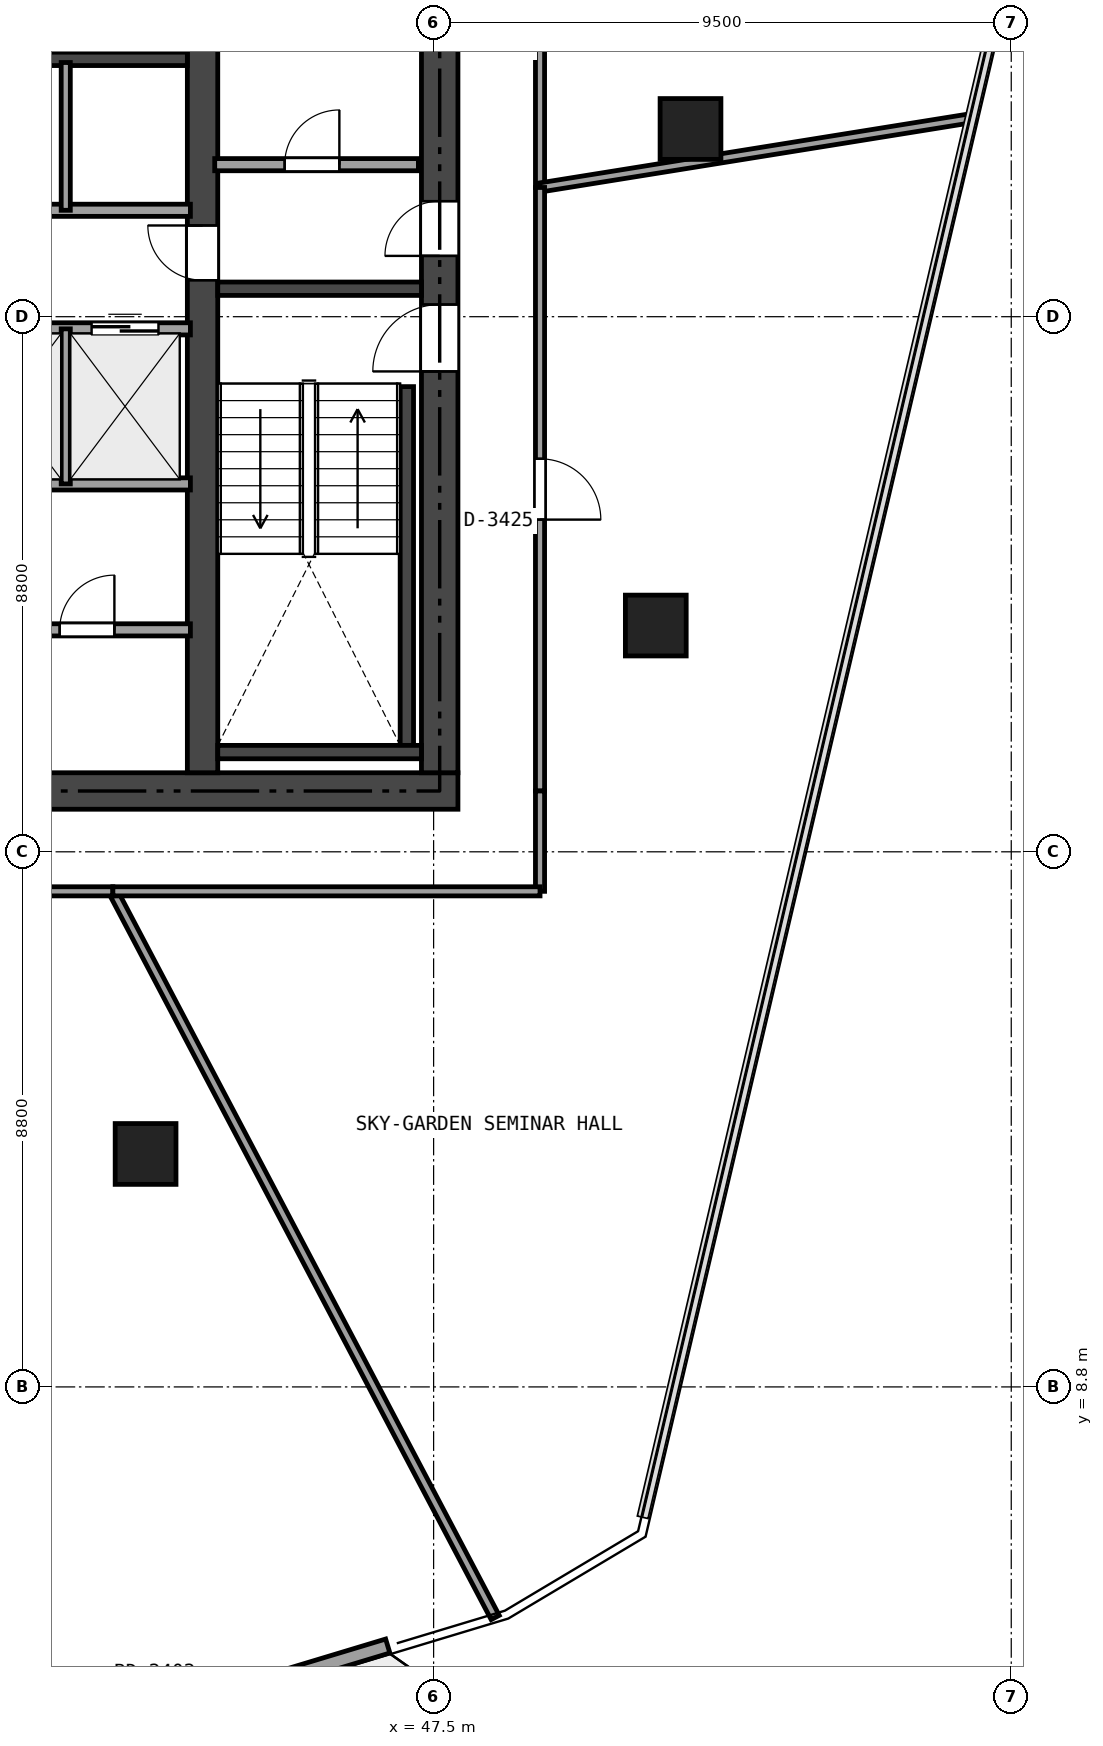
"""IFC4 building model, lengths in metres.
Left out: names, types, materials, properties, quantities, classifications, styles, units other than length and angle.
Written with IfcOpenShell. Run it as: python <this file> out.ifc"""

import sys

from ifc_helpers import new_model, si_unit, direction, frame, frame_2d, origin, origin_2d, place, context, subcontext, project, spatial, rectangle, extrude, element, fill, save


model = new_model("IFC4")
c1 = context("Model", 3, precision=1e-05, world=origin(), true_north=direction((0.0, 1.0)))
c2 = subcontext(c1, "Body", "Model", "MODEL_VIEW")
j1 = project(units=[si_unit("LENGTHUNIT", "METRE"), si_unit("PLANEANGLEUNIT", "RADIAN")], contexts=[c1])
p1 = place(None, origin())
s1 = spatial("IfcSite", under=j1, at=p1, CompositionType="ELEMENT")
p2 = place(p1, origin())
s2 = spatial("IfcBuilding", under=s1, at=p2, CompositionType="ELEMENT")
p3 = place(p2, frame((0.0, 0.0, 129.3)))
s3 = spatial("IfcBuildingStorey", under=s2, at=p3, CompositionType="ELEMENT", Elevation=129.3)
p4 = place(p3, frame((26.5, 18.6, 0.0), z_axis=(0.0, 0.0, 1.0), x_axis=(1.0, 0.0, 0.0)))
e1 = element("IfcWall", 1, at=p4, inside=s3, PredefinedType="SHEAR", context=c2, shape_type="SweptSolid", body=[
    extrude(rectangle(XDim=21.4, YDim=0.6, at=frame_2d((10.7, 0.0))), origin(), (0.0, 0.0, 1.0), 3.32),
])
p5 = place(p4, frame((12.425, 0.0, 0.0)))
e2 = element("IfcOpeningElement", 2, at=p5, cuts=e1, PredefinedType="OPENING", context=c2, shape_type="SweptSolid", body=[
    extrude(rectangle(XDim=1.15, YDim=2.15, at=frame_2d((0.575, 1.075))), frame((0.0, 0.31, 0.0), z_axis=(0.0, -1.0, 0.0), x_axis=(1.0, 0.0, 0.0)), (0.0, 0.0, 1.0), 0.62),
])
p6 = place(p4, frame((5.25, 0.0, 0.0)))
e3 = element("IfcOpeningElement", 3, at=p6, cuts=e1, PredefinedType="OPENING", context=c2, shape_type="SweptSolid", body=[
    extrude(rectangle(XDim=0.9, YDim=2.1, at=frame_2d((0.45, 1.05))), frame((0.0, 0.31, 0.0), z_axis=(0.0, -1.0, 0.0), x_axis=(1.0, 0.0, 0.0)), (0.0, 0.0, 1.0), 0.62),
])
p7 = place(p3, frame((47.6, 18.9, 0.0), z_axis=(0.0, 0.0, 1.0), x_axis=(0.0, 1.0, 0.0)))
e4 = element("IfcWall", 4, at=p7, inside=s3, PredefinedType="SHEAR", context=c2, shape_type="SweptSolid", body=[
    extrude(rectangle(XDim=15.0, YDim=0.6, at=frame_2d((7.5, 0.0))), origin(), (0.0, 0.0, 1.0), 3.32),
])
p8 = place(p7, frame((6.6, 0.0, 0.0)))
e5 = element("IfcOpeningElement", 5, at=p8, cuts=e4, PredefinedType="OPENING", context=c2, shape_type="SweptSolid", body=[
    extrude(rectangle(XDim=1.1, YDim=2.15, at=frame_2d((0.55, 1.075))), frame((0.0, 0.31, 0.0), z_axis=(0.0, -1.0, 0.0), x_axis=(1.0, 0.0, 0.0)), (0.0, 0.0, 1.0), 0.62),
])
p9 = place(p7, frame((8.5, 0.0, 0.0)))
e6 = element("IfcOpeningElement", 6, at=p9, cuts=e4, PredefinedType="OPENING", context=c2, shape_type="SweptSolid", body=[
    extrude(rectangle(XDim=0.9, YDim=2.1, at=frame_2d((0.45, 1.05))), frame((0.0, 0.31, 0.0), z_axis=(0.0, -1.0, 0.0), x_axis=(1.0, 0.0, 0.0)), (0.0, 0.0, 1.0), 0.62),
])
p10 = place(p7, frame((13.15, 0.0, 0.0)))
e7 = element("IfcOpeningElement", 7, at=p10, cuts=e4, PredefinedType="OPENING", context=c2, shape_type="SweptSolid", body=[
    extrude(rectangle(XDim=0.9, YDim=2.1, at=frame_2d((0.45, 1.05))), frame((0.0, 0.31, 0.0), z_axis=(0.0, -1.0, 0.0), x_axis=(1.0, 0.0, 0.0)), (0.0, 0.0, 1.0), 0.62),
])
p11 = place(p3, frame((43.7, 18.9, 0.0), z_axis=(0.0, 0.0, 1.0), x_axis=(0.0, 1.0, 0.0)))
e8 = element("IfcWall", 8, at=p11, inside=s3, PredefinedType="SHEAR", context=c2, shape_type="SweptSolid", body=[
    extrude(rectangle(XDim=15.0, YDim=0.5, at=frame_2d((7.5, 0.0))), origin(), (0.0, 0.0, 1.0), 3.32),
])
p12 = place(p11, frame((8.1, 0.0, 0.0)))
e9 = element("IfcOpeningElement", 9, at=p12, cuts=e8, PredefinedType="OPENING", context=c2, shape_type="SweptSolid", body=[
    extrude(rectangle(XDim=0.9, YDim=2.1, at=frame_2d((0.45, 1.05))), frame((0.0, 0.26, 0.0), z_axis=(0.0, -1.0, 0.0), x_axis=(1.0, 0.0, 0.0)), (0.0, 0.0, 1.0), 0.52),
])
p13 = place(p3, frame((43.95, 26.86, 0.0), z_axis=(0.0, 0.0, 1.0), x_axis=(1.0, 0.0, 0.0)))
e10 = element("IfcWall", 10, at=p13, inside=s3, PredefinedType="SHEAR", context=c2, shape_type="SweptSolid", body=[
    extrude(rectangle(XDim=3.35, YDim=0.22, at=frame_2d((1.675, 0.0))), origin(), (0.0, 0.0, 1.0), 3.32),
])
p14 = place(p3, frame((47.06, 19.35, 0.0), z_axis=(0.0, 0.0, 1.0), x_axis=(0.0, 1.0, 0.0)))
e11 = element("IfcWall", 11, at=p14, inside=s3, PredefinedType="SHEAR", context=c2, shape_type="SweptSolid", body=[
    extrude(rectangle(XDim=5.9, YDim=0.22, at=frame_2d((2.95, 0.0))), origin(), (0.0, 0.0, 1.0), 3.32),
])
p15 = place(p3, frame((43.95, 19.24, 0.0), z_axis=(0.0, 0.0, 1.0), x_axis=(1.0, 0.0, 0.0)))
e12 = element("IfcWall", 12, at=p15, inside=s3, PredefinedType="SHEAR", context=c2, shape_type="SweptSolid", body=[
    extrude(rectangle(XDim=3.35, YDim=0.22, at=frame_2d((1.675, 0.0))), origin(), (0.0, 0.0, 1.0), 3.32),
])
p16 = place(p3, frame((35.84, 30.64, 0.0), z_axis=(0.0, 0.0, 1.0), x_axis=(1.0, 0.0, 0.0)))
e13 = element("IfcWall", 13, at=p16, inside=s3, PredefinedType="SHEAR", context=c2, shape_type="SweptSolid", body=[
    extrude(rectangle(XDim=7.61, YDim=0.22, at=frame_2d((3.805, 0.0))), origin(), (0.0, 0.0, 1.0), 3.32),
])
for number, where, z_axis, x_axis in (
    (14, (51.725, 29.487, 0.0), (0.0, 0.0, 1.0), (1.0, 0.0, 0.0)),
    (15, (42.763, 12.631, 0.0), (0.0, 0.0, 1.0), (1.0, 0.0, 0.0)),
    (16, (51.154, 21.321, 0.0), (0.0, 0.0, 1.0), (1.0, 0.0, 0.0)),
):
    element("IfcColumn", number, at=place(p3, frame(where, z_axis=z_axis, x_axis=x_axis)), inside=s3, PredefinedType="COLUMN", context=c2, shape_type="SweptSolid", body=[
        extrude(rectangle(XDim=1.0, YDim=1.0, at=origin_2d()), origin(), (0.0, 0.0, 1.0), 3.32),
    ])
p17 = place(p3, frame((46.746, 4.539, 0.0), z_axis=(0.0, 0.0, 1.0), x_axis=(-0.957335469259, -0.288978890748, 0.0)))
e17 = element("IfcWall", 17, at=p17, inside=s3, PredefinedType="SOLIDWALL", context=c2, shape_type="SweptSolid", body=[
    extrude(rectangle(XDim=4.599, YDim=0.24, at=frame_2d((2.3, 0.0))), origin(), (0.0, 0.0, 1.0), 3.32),
])
p18 = place(p17, frame((3.079, 0.0, 0.0)))
e18 = element("IfcOpeningElement", 18, at=p18, cuts=e17, PredefinedType="OPENING", context=c2, shape_type="SweptSolid", body=[
    extrude(rectangle(XDim=1.0, YDim=2.15, at=frame_2d((0.5, 1.075))), frame((0.0, 0.13, 0.0), z_axis=(0.0, -1.0, 0.0), x_axis=(1.0, 0.0, 0.0)), (0.0, 0.0, 1.0), 0.26),
])
p19 = place(p3, frame((43.9, 28.9, 0.0), z_axis=(0.0, 0.0, 1.0), x_axis=(1.0, 0.0, 0.0)))
e19 = element("IfcWall", 19, at=p19, inside=s3, PredefinedType="SOLIDWALL", context=c2, shape_type="SweptSolid", body=[
    extrude(rectangle(XDim=3.35, YDim=0.2, at=frame_2d((1.675, 0.0))), origin(), (0.0, 0.0, 1.0), 3.32),
])
p20 = place(p19, frame((1.15, 0.0, 0.0)))
e20 = element("IfcOpeningElement", 20, at=p20, cuts=e19, PredefinedType="OPENING", context=c2, shape_type="SweptSolid", body=[
    extrude(rectangle(XDim=0.9, YDim=2.1, at=frame_2d((0.45, 1.05))), frame((0.0, 0.11, 0.0), z_axis=(0.0, -1.0, 0.0), x_axis=(1.0, 0.0, 0.0)), (0.0, 0.0, 1.0), 0.22),
])
p21 = place(p3, frame((35.62, 28.15, 0.0), z_axis=(0.0, 0.0, 1.0), x_axis=(1.0, 0.0, 0.0)))
e21 = element("IfcWall", 21, at=p21, inside=s3, PredefinedType="SOLIDWALL", context=c2, shape_type="SweptSolid", body=[
    extrude(rectangle(XDim=7.88, YDim=0.2, at=frame_2d((3.94, 0.0))), origin(), (0.0, 0.0, 1.0), 3.32),
])
p22 = place(p3, frame((35.62, 26.2, 0.0), z_axis=(0.0, 0.0, 1.0), x_axis=(1.0, 0.0, 0.0)))
e22 = element("IfcWall", 22, at=p22, inside=s3, PredefinedType="SOLIDWALL", context=c2, shape_type="SweptSolid", body=[
    extrude(rectangle(XDim=7.88, YDim=0.2, at=frame_2d((3.94, 0.0))), origin(), (0.0, 0.0, 1.0), 3.32),
])
p23 = place(p22, frame((0.405, 0.0, 0.0)))
e23 = element("IfcOpeningElement", 23, at=p23, cuts=e22, PredefinedType="OPENING", context=c2, shape_type="SweptSolid", body=[
    extrude(rectangle(XDim=1.1, YDim=2.15, at=frame_2d((0.55, 1.075))), frame((0.0, 0.11, 0.0), z_axis=(0.0, -1.0, 0.0), x_axis=(1.0, 0.0, 0.0)), (0.0, 0.0, 1.0), 0.22),
])
p24 = place(p22, frame((2.355, 0.0, 0.0)))
e24 = element("IfcOpeningElement", 24, at=p24, cuts=e22, PredefinedType="OPENING", context=c2, shape_type="SweptSolid", body=[
    extrude(rectangle(XDim=1.1, YDim=2.15, at=frame_2d((0.55, 1.075))), frame((0.0, 0.11, 0.0), z_axis=(0.0, -1.0, 0.0), x_axis=(1.0, 0.0, 0.0)), (0.0, 0.0, 1.0), 0.22),
])
p25 = place(p22, frame((4.305, 0.0, 0.0)))
e25 = element("IfcOpeningElement", 25, at=p25, cuts=e22, PredefinedType="OPENING", context=c2, shape_type="SweptSolid", body=[
    extrude(rectangle(XDim=1.1, YDim=2.15, at=frame_2d((0.55, 1.075))), frame((0.0, 0.11, 0.0), z_axis=(0.0, -1.0, 0.0), x_axis=(1.0, 0.0, 0.0)), (0.0, 0.0, 1.0), 0.22),
])
p26 = place(p22, frame((6.255, 0.0, 0.0)))
e26 = element("IfcOpeningElement", 26, at=p26, cuts=e22, PredefinedType="OPENING", context=c2, shape_type="SweptSolid", body=[
    extrude(rectangle(XDim=1.1, YDim=2.15, at=frame_2d((0.55, 1.075))), frame((0.0, 0.11, 0.0), z_axis=(0.0, -1.0, 0.0), x_axis=(1.0, 0.0, 0.0)), (0.0, 0.0, 1.0), 0.22),
])
p27 = place(p3, frame((35.62, 23.65, 0.0), z_axis=(0.0, 0.0, 1.0), x_axis=(1.0, 0.0, 0.0)))
e27 = element("IfcWall", 27, at=p27, inside=s3, PredefinedType="SOLIDWALL", context=c2, shape_type="SweptSolid", body=[
    extrude(rectangle(XDim=7.88, YDim=0.2, at=frame_2d((3.94, 0.0))), origin(), (0.0, 0.0, 1.0), 2.841),
])
p28 = place(p3, frame((35.62, 21.25, 0.0), z_axis=(0.0, 0.0, 1.0), x_axis=(1.0, 0.0, 0.0)))
e28 = element("IfcWall", 28, at=p28, inside=s3, PredefinedType="SOLIDWALL", context=c2, shape_type="SweptSolid", body=[
    extrude(rectangle(XDim=7.88, YDim=0.2, at=frame_2d((3.94, 0.0))), origin(), (0.0, 0.0, 1.0), 3.32),
])
p29 = place(p28, frame((1.13, 0.0, 0.0)))
e29 = element("IfcOpeningElement", 29, at=p29, cuts=e28, PredefinedType="OPENING", context=c2, shape_type="SweptSolid", body=[
    extrude(rectangle(XDim=0.9, YDim=2.1, at=frame_2d((0.45, 1.05))), frame((0.0, 0.11, 0.0), z_axis=(0.0, -1.0, 0.0), x_axis=(1.0, 0.0, 0.0)), (0.0, 0.0, 1.0), 0.22),
])
p30 = place(p28, frame((5.73, 0.0, 0.0)))
e30 = element("IfcOpeningElement", 30, at=p30, cuts=e28, PredefinedType="OPENING", context=c2, shape_type="SweptSolid", body=[
    extrude(rectangle(XDim=0.9, YDim=2.1, at=frame_2d((0.45, 1.05))), frame((0.0, 0.11, 0.0), z_axis=(0.0, -1.0, 0.0), x_axis=(1.0, 0.0, 0.0)), (0.0, 0.0, 1.0), 0.22),
])
p31 = place(p3, frame((41.45, 28.15, 0.0), z_axis=(0.0, 0.0, 1.0), x_axis=(0.0, 1.0, 0.0)))
e31 = element("IfcWall", 31, at=p31, inside=s3, PredefinedType="PARTITIONING", context=c2, shape_type="SweptSolid", body=[
    extrude(rectangle(XDim=2.43, YDim=0.15, at=frame_2d((1.215, 0.0))), origin(), (0.0, 0.0, 1.0), 3.32),
])
p32 = place(p3, frame((41.45, 23.65, 0.0), z_axis=(0.0, 0.0, 1.0), x_axis=(0.0, 1.0, 0.0)))
e32 = element("IfcWall", 32, at=p32, inside=s3, PredefinedType="PARTITIONING", context=c2, shape_type="SweptSolid", body=[
    extrude(rectangle(XDim=2.55, YDim=0.15, at=frame_2d((1.275, 0.0))), origin(), (0.0, 0.0, 1.0), 2.841),
])
p33 = place(p3, frame((49.25, 34.2, 0.0), z_axis=(0.0, 0.0, 1.0), x_axis=(0.0, -1.0, 0.0)))
e33 = element("IfcWall", 33, at=p33, inside=s3, PredefinedType="PARTITIONING", context=c2, shape_type="SweptSolid", body=[
    extrude(rectangle(XDim=5.675, YDim=0.15, at=frame_2d((2.837, 0.0))), origin(), (0.0, 0.0, 1.0), 2.687),
])
p34 = place(p33, frame((2.338, 0.0, 0.0)))
e34 = element("IfcOpeningElement", 34, at=p34, cuts=e33, PredefinedType="OPENING", context=c2, shape_type="SweptSolid", body=[
    extrude(rectangle(XDim=1.0, YDim=2.15, at=frame_2d((0.5, 1.075))), frame((0.0, 0.085, 0.0), z_axis=(0.0, -1.0, 0.0), x_axis=(1.0, 0.0, 0.0)), (0.0, 0.0, 1.0), 0.17),
])
p35 = place(p3, frame((49.25, 28.525, 0.0), z_axis=(0.0, 0.0, 1.0), x_axis=(0.987338784073, 0.158625740235, 0.0)))
e35 = element("IfcWall", 35, at=p35, inside=s3, PredefinedType="PARTITIONING", context=c2, shape_type="SweptSolid", body=[
    extrude(rectangle(XDim=7.225, YDim=0.15, at=frame_2d((3.612, 0.0))), origin(), (0.0, 0.0, 1.0), 2.805),
])
p36 = place(p3, frame((48.513, 5.008, 0.0), z_axis=(0.0, 0.0, 1.0), x_axis=(-0.465899265879, 0.884837767082, 0.0)))
e36 = element("IfcWall", 36, at=p36, inside=s3, PredefinedType="PARTITIONING", context=c2, shape_type="SweptSolid", body=[
    extrude(rectangle(XDim=13.496, YDim=0.15, at=frame_2d((6.748, 0.0))), origin(), (0.0, 0.0, 1.0), 2.805),
])
p37 = place(p3, frame((42.225, 16.95, 0.0), z_axis=(0.0, 0.0, 1.0), x_axis=(-1.0, 0.0, 0.0)))
e37 = element("IfcWall", 37, at=p37, inside=s3, PredefinedType="PARTITIONING", context=c2, shape_type="SweptSolid", body=[
    extrude(rectangle(XDim=14.151, YDim=0.15, at=frame_2d((7.076, 0.0))), origin(), (0.0, 0.0, 1.0), 2.687),
])
p38 = place(p37, frame((6.576, 0.0, 0.0)))
e38 = element("IfcOpeningElement", 38, at=p38, cuts=e37, PredefinedType="OPENING", context=c2, shape_type="SweptSolid", body=[
    extrude(rectangle(XDim=1.0, YDim=2.15, at=frame_2d((0.5, 1.075))), frame((0.0, 0.085, 0.0), z_axis=(0.0, -1.0, 0.0), x_axis=(1.0, 0.0, 0.0)), (0.0, 0.0, 1.0), 0.17),
])
p39 = place(p3, frame((49.25, 28.525, 0.0), z_axis=(0.0, 0.0, 1.0), x_axis=(0.0, -1.0, 0.0)))
e39 = element("IfcWall", 39, at=p39, inside=s3, PredefinedType="PARTITIONING", context=c2, shape_type="SweptSolid", body=[
    extrude(rectangle(XDim=9.925, YDim=0.15, at=frame_2d((4.962, 0.0))), origin(), (0.0, 0.0, 1.0), 2.687),
])
p40 = place(p39, frame((4.462, 0.0, 0.0)))
e40 = element("IfcOpeningElement", 40, at=p40, cuts=e39, PredefinedType="OPENING", context=c2, shape_type="SweptSolid", body=[
    extrude(rectangle(XDim=1.0, YDim=2.15, at=frame_2d((0.5, 1.075))), frame((0.0, 0.085, 0.0), z_axis=(0.0, -1.0, 0.0), x_axis=(1.0, 0.0, 0.0)), (0.0, 0.0, 1.0), 0.17),
])
p41 = place(p3, frame((49.25, 18.6, 0.0), z_axis=(0.0, 0.0, 1.0), x_axis=(0.0, -1.0, 0.0)))
e41 = element("IfcWall", 41, at=p41, inside=s3, PredefinedType="PARTITIONING", context=c2, shape_type="SweptSolid", body=[
    extrude(rectangle(XDim=1.65, YDim=0.15, at=frame_2d((0.825, 0.0))), origin(), (0.0, 0.0, 1.0), 3.32),
])
p42 = place(p3, frame((49.25, 16.95, 0.0), z_axis=(0.0, 0.0, 1.0), x_axis=(-1.0, 0.0, 0.0)))
e42 = element("IfcWall", 42, at=p42, inside=s3, PredefinedType="PARTITIONING", context=c2, shape_type="SweptSolid", body=[
    extrude(rectangle(XDim=7.025, YDim=0.15, at=frame_2d((3.512, 0.0))), origin(), (0.0, 0.0, 1.0), 2.805),
])
p43 = place(p8, origin())
e43 = element("IfcDoor", 43, at=p43, inside=s3, OperationType="SINGLE_SWING_LEFT", PredefinedType="DOOR", context=c2, shape_type="SweptSolid", body=[
    extrude(rectangle(XDim=1.1, YDim=2.15, at=frame_2d((0.55, 1.075))), frame((0.0, 0.025, 0.0), z_axis=(0.0, -1.0, 0.0), x_axis=(1.0, 0.0, 0.0)), (0.0, 0.0, 1.0), 0.05),
])
fill(e5, e43)
p44 = place(p12, origin())
e44 = element("IfcDoor", 44, at=p44, inside=s3, OperationType="SINGLE_SWING_RIGHT", PredefinedType="DOOR", context=c2, shape_type="SweptSolid", body=[
    extrude(rectangle(XDim=0.9, YDim=2.1, at=frame_2d((0.45, 1.05))), frame((0.0, 0.025, 0.0), z_axis=(0.0, -1.0, 0.0), x_axis=(1.0, 0.0, 0.0)), (0.0, 0.0, 1.0), 0.05),
])
fill(e9, e44)
p45 = place(p9, origin())
e45 = element("IfcDoor", 45, at=p45, inside=s3, OperationType="SINGLE_SWING_LEFT", PredefinedType="DOOR", context=c2, shape_type="SweptSolid", body=[
    extrude(rectangle(XDim=0.9, YDim=2.1, at=frame_2d((0.45, 1.05))), frame((0.0, 0.025, 0.0), z_axis=(0.0, -1.0, 0.0), x_axis=(1.0, 0.0, 0.0)), (0.0, 0.0, 1.0), 0.05),
])
fill(e6, e45)
p46 = place(p20, origin())
e46 = element("IfcDoor", 46, at=p46, inside=s3, OperationType="SINGLE_SWING_RIGHT", PredefinedType="DOOR", context=c2, shape_type="SweptSolid", body=[
    extrude(rectangle(XDim=0.9, YDim=2.1, at=frame_2d((0.45, 1.05))), frame((0.0, 0.025, 0.0), z_axis=(0.0, -1.0, 0.0), x_axis=(1.0, 0.0, 0.0)), (0.0, 0.0, 1.0), 0.05),
])
fill(e20, e46)
p47 = place(p30, origin())
e47 = element("IfcDoor", 47, at=p47, inside=s3, OperationType="SINGLE_SWING_RIGHT", PredefinedType="DOOR", context=c2, shape_type="SweptSolid", body=[
    extrude(rectangle(XDim=0.9, YDim=2.1, at=frame_2d((0.45, 1.05))), frame((0.0, 0.025, 0.0), z_axis=(0.0, -1.0, 0.0), x_axis=(1.0, 0.0, 0.0)), (0.0, 0.0, 1.0), 0.05),
])
fill(e30, e47)
p48 = place(p26, origin())
e48 = element("IfcDoor", 48, at=p48, inside=s3, OperationType="SLIDING_TO_LEFT", PredefinedType="DOOR", context=c2, shape_type="SweptSolid", body=[
    extrude(rectangle(XDim=1.1, YDim=2.15, at=frame_2d((0.55, 1.075))), frame((0.0, 0.025, 0.0), z_axis=(0.0, -1.0, 0.0), x_axis=(1.0, 0.0, 0.0)), (0.0, 0.0, 1.0), 0.05),
])
fill(e26, e48)
p49 = place(p40, origin())
e49 = element("IfcDoor", 49, at=p49, inside=s3, OperationType="SINGLE_SWING_RIGHT", PredefinedType="DOOR", context=c2, shape_type="SweptSolid", body=[
    extrude(rectangle(XDim=1.0, YDim=2.15, at=frame_2d((0.5, 1.075))), frame((0.0, 0.025, 0.0), z_axis=(0.0, -1.0, 0.0), x_axis=(1.0, 0.0, 0.0)), (0.0, 0.0, 1.0), 0.05),
])
fill(e40, e49)
save(model, sys.argv[1])
